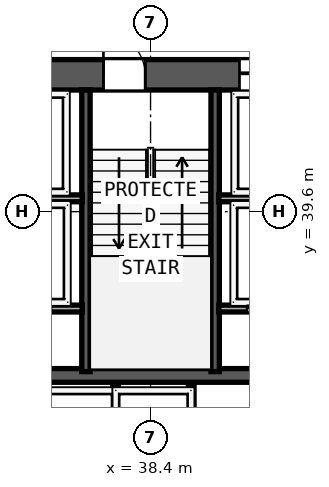
"""IFC4 building model, lengths in metres.
Left out: names, types, materials, properties, quantities, classifications, styles, units other than length and angle.
Written with IfcOpenShell. Run it as: python <this file> out.ifc"""

import sys

from ifc_helpers import new_model, si_unit, direction, frame, frame_2d, origin, place, context, subcontext, project, spatial, rectangle, extrude, element, fill, save


model = new_model("IFC4")
c1 = context("Model", 3, precision=1e-05, world=origin(), true_north=direction((0.0, 1.0)))
c2 = subcontext(c1, "Body", "Model", "MODEL_VIEW")
j1 = project(units=[si_unit("LENGTHUNIT", "METRE"), si_unit("PLANEANGLEUNIT", "RADIAN")], contexts=[c1])
p1 = place(None, origin())
s1 = spatial("IfcSite", under=j1, at=p1, CompositionType="ELEMENT")
p2 = place(p1, origin())
s2 = spatial("IfcBuilding", under=s1, at=p2, CompositionType="ELEMENT")
p3 = place(p2, frame((0.0, 0.0, 70.4)))
s3 = spatial("IfcBuildingStorey", under=s2, at=p3, CompositionType="ELEMENT", Elevation=70.4)
p4 = place(p3, frame((29.6, 43.2, 0.0), z_axis=(0.0, 0.0, 1.0), x_axis=(1.0, 0.0, 0.0)))
e1 = element("IfcWall", 1, at=p4, inside=s3, PredefinedType="SHEAR", context=c2, shape_type="SweptSolid", body=[
    extrude(rectangle(XDim=17.6, YDim=0.8, at=frame_2d((8.8, 0.0))), origin(), (0.0, 0.0, 1.0), 3.6),
])
p5 = place(p4, frame((2.45, 0.0, 0.0)))
e2 = element("IfcOpeningElement", 2, at=p5, cuts=e1, PredefinedType="OPENING", context=c2, shape_type="SweptSolid", body=[
    extrude(rectangle(XDim=1.1, YDim=2.15, at=frame_2d((0.55, 1.075))), frame((0.0, 0.41, 0.0), z_axis=(0.0, -1.0, 0.0), x_axis=(1.0, 0.0, 0.0)), (0.0, 0.0, 1.0), 0.82),
])
p6 = place(p4, frame((7.56, 0.0, 0.0)))
e3 = element("IfcOpeningElement", 3, at=p6, cuts=e1, PredefinedType="OPENING", context=c2, shape_type="SweptSolid", body=[
    extrude(rectangle(XDim=1.1, YDim=2.15, at=frame_2d((0.55, 1.075))), frame((0.0, 0.41, 0.0), z_axis=(0.0, -1.0, 0.0), x_axis=(1.0, 0.0, 0.0)), (0.0, 0.0, 1.0), 0.82),
])
p7 = place(p4, frame((13.65, 0.0, 0.0)))
e4 = element("IfcOpeningElement", 4, at=p7, cuts=e1, PredefinedType="OPENING", context=c2, shape_type="SweptSolid", body=[
    extrude(rectangle(XDim=1.1, YDim=2.15, at=frame_2d((0.55, 1.075))), frame((0.0, 0.41, 0.0), z_axis=(0.0, -1.0, 0.0), x_axis=(1.0, 0.0, 0.0)), (0.0, 0.0, 1.0), 0.82),
])
p8 = place(p4, frame((4.78, 0.0, 0.0)))
e5 = element("IfcOpeningElement", 5, at=p8, cuts=e1, PredefinedType="OPENING", context=c2, shape_type="SweptSolid", body=[
    extrude(rectangle(XDim=1.1, YDim=2.2, at=frame_2d((0.55, 1.1))), frame((0.0, 0.41, 0.0), z_axis=(0.0, -1.0, 0.0), x_axis=(1.0, 0.0, 0.0)), (0.0, 0.0, 1.0), 0.82),
])
p9 = place(p4, frame((11.14, 0.0, 0.0)))
e6 = element("IfcOpeningElement", 6, at=p9, cuts=e1, PredefinedType="OPENING", context=c2, shape_type="SweptSolid", body=[
    extrude(rectangle(XDim=1.1, YDim=2.2, at=frame_2d((0.55, 1.1))), frame((0.0, 0.41, 0.0), z_axis=(0.0, -1.0, 0.0), x_axis=(1.0, 0.0, 0.0)), (0.0, 0.0, 1.0), 0.82),
])
p10 = place(p3, frame((30.4, 35.29, 0.0), z_axis=(0.0, 0.0, 1.0), x_axis=(1.0, 0.0, 0.0)))
e7 = element("IfcWall", 7, at=p10, inside=s3, PredefinedType="SHEAR", context=c2, shape_type="SweptSolid", body=[
    extrude(rectangle(XDim=16.0, YDim=0.36, at=frame_2d((8.0, 0.0))), origin(), (0.0, 0.0, 1.0), 3.6),
])
p11 = place(p10, frame((4.95, 0.0, 0.0), z_axis=(0.0, 0.0, 1.0), x_axis=(-1.0, 0.0, 0.0)))
e8 = element("IfcOpeningElement", 8, at=p11, cuts=e7, PredefinedType="OPENING", context=c2, shape_type="SweptSolid", body=[
    extrude(rectangle(XDim=0.9, YDim=2.1, at=frame_2d((0.45, 1.05))), frame((0.0, 0.19, 0.0), z_axis=(0.0, -1.0, 0.0), x_axis=(1.0, 0.0, 0.0)), (0.0, 0.0, 1.0), 0.38),
])
p12 = place(p10, frame((12.01, 0.0, 0.0), z_axis=(0.0, 0.0, 1.0), x_axis=(-1.0, 0.0, 0.0)))
e9 = element("IfcOpeningElement", 9, at=p12, cuts=e7, PredefinedType="OPENING", context=c2, shape_type="SweptSolid", body=[
    extrude(rectangle(XDim=0.9, YDim=2.1, at=frame_2d((0.45, 1.05))), frame((0.0, 0.19, 0.0), z_axis=(0.0, -1.0, 0.0), x_axis=(1.0, 0.0, 0.0)), (0.0, 0.0, 1.0), 0.38),
])
for number, where, z_axis, x_axis in (
    (10, (36.7, 35.39, 0.0), (0.0, 0.0, 1.0), (0.0, 1.0, 0.0)),
    (11, (40.1, 35.39, 0.0), (0.0, 0.0, 1.0), (0.0, 1.0, 0.0)),
):
    element("IfcWall", number, at=place(p3, frame(where, z_axis=z_axis, x_axis=x_axis)), inside=s3, PredefinedType="SHEAR", context=c2, shape_type="SweptSolid", body=[
        extrude(rectangle(XDim=7.41, YDim=0.22, at=frame_2d((3.705, 0.0))), origin(), (0.0, 0.0, 1.0), 3.6),
    ])
for number, where, z_axis, x_axis in (
    (12, (33.835, 39.95, 0.0), (0.0, 0.0, 1.0), (1.0, 0.0, 0.0)),
    (13, (40.195, 39.95, 0.0), (0.0, 0.0, 1.0), (1.0, 0.0, 0.0)),
):
    element("IfcWall", number, at=place(p3, frame(where, z_axis=z_axis, x_axis=x_axis)), inside=s3, PredefinedType="SOLIDWALL", context=c2, shape_type="SweptSolid", body=[
        extrude(rectangle(XDim=2.77, YDim=0.18, at=frame_2d((1.385, 0.0))), origin(), (0.0, 0.0, 1.0), 3.6),
    ])
p13 = place(p3, frame((33.835, 37.05, 0.0), z_axis=(0.0, 0.0, 1.0), x_axis=(1.0, 0.0, 0.0)))
e14 = element("IfcWall", 14, at=p13, inside=s3, PredefinedType="SOLIDWALL", context=c2, shape_type="SweptSolid", body=[
    extrude(rectangle(XDim=2.77, YDim=0.18, at=frame_2d((1.385, 0.0))), origin(), (0.0, 0.0, 1.0), 3.6),
])
p14 = place(p13, frame((1.945, 0.0, 0.0), z_axis=(0.0, 0.0, 1.0), x_axis=(-1.0, 0.0, 0.0)))
e15 = element("IfcOpeningElement", 15, at=p14, cuts=e14, PredefinedType="OPENING", context=c2, shape_type="SweptSolid", body=[
    extrude(rectangle(XDim=1.2, YDim=2.2, at=frame_2d((0.6, 1.1))), frame((0.0, 0.1, 0.0), z_axis=(0.0, -1.0, 0.0), x_axis=(1.0, 0.0, 0.0)), (0.0, 0.0, 1.0), 0.2),
])
p15 = place(p3, frame((40.195, 37.05, 0.0), z_axis=(0.0, 0.0, 1.0), x_axis=(1.0, 0.0, 0.0)))
e16 = element("IfcWall", 16, at=p15, inside=s3, PredefinedType="SOLIDWALL", context=c2, shape_type="SweptSolid", body=[
    extrude(rectangle(XDim=2.77, YDim=0.18, at=frame_2d((1.385, 0.0))), origin(), (0.0, 0.0, 1.0), 3.6),
])
p16 = place(p15, frame((1.945, 0.0, 0.0), z_axis=(0.0, 0.0, 1.0), x_axis=(-1.0, 0.0, 0.0)))
e17 = element("IfcOpeningElement", 17, at=p16, cuts=e16, PredefinedType="OPENING", context=c2, shape_type="SweptSolid", body=[
    extrude(rectangle(XDim=1.2, YDim=2.2, at=frame_2d((0.6, 1.1))), frame((0.0, 0.1, 0.0), z_axis=(0.0, -1.0, 0.0), x_axis=(1.0, 0.0, 0.0)), (0.0, 0.0, 1.0), 0.2),
])
for number, where, z_axis, x_axis in (
    (18, (37.48, 32.95, 0.0), (0.0, 0.0, 1.0), (0.0, 1.0, 0.0)),
    (19, (39.47, 32.95, 0.0), (0.0, 0.0, 1.0), (0.0, 1.0, 0.0)),
):
    element("IfcWall", number, at=place(p3, frame(where, z_axis=z_axis, x_axis=x_axis)), inside=s3, PredefinedType="SOLIDWALL", context=c2, shape_type="SweptSolid", body=[
        extrude(rectangle(XDim=2.05, YDim=0.15, at=frame_2d((1.025, 0.0))), origin(), (0.0, 0.0, 1.0), 3.6),
    ])
p17 = place(p6, origin())
e20 = element("IfcDoor", 20, at=p17, inside=s3, OperationType="SINGLE_SWING_LEFT", PredefinedType="DOOR", context=c2, shape_type="SweptSolid", body=[
    extrude(rectangle(XDim=1.1, YDim=2.15, at=frame_2d((0.55, 1.075))), frame((0.0, 0.185, 0.0), z_axis=(0.0, -1.0, 0.0), x_axis=(1.0, 0.0, 0.0)), (0.0, 0.0, 1.0), 0.05),
])
fill(e3, e20)
p18 = place(p9, origin())
e21 = element("IfcDoor", 21, at=p18, inside=s3, OperationType="SLIDING_TO_LEFT", PredefinedType="DOOR", context=c2, shape_type="SweptSolid", body=[
    extrude(rectangle(XDim=1.1, YDim=2.2, at=frame_2d((0.55, 1.1))), frame((0.0, 0.185, 0.0), z_axis=(0.0, -1.0, 0.0), x_axis=(1.0, 0.0, 0.0)), (0.0, 0.0, 1.0), 0.05),
])
fill(e6, e21)
p19 = place(p16, origin())
e22 = element("IfcDoor", 22, at=p19, inside=s3, OperationType="SLIDING_TO_RIGHT", PredefinedType="DOOR", context=c2, shape_type="SweptSolid", body=[
    extrude(rectangle(XDim=1.2, YDim=2.2, at=frame_2d((0.6, 1.1))), frame((0.0, 0.025, 0.0), z_axis=(0.0, -1.0, 0.0), x_axis=(1.0, 0.0, 0.0)), (0.0, 0.0, 1.0), 0.05),
])
fill(e17, e22)
save(model, sys.argv[1])
